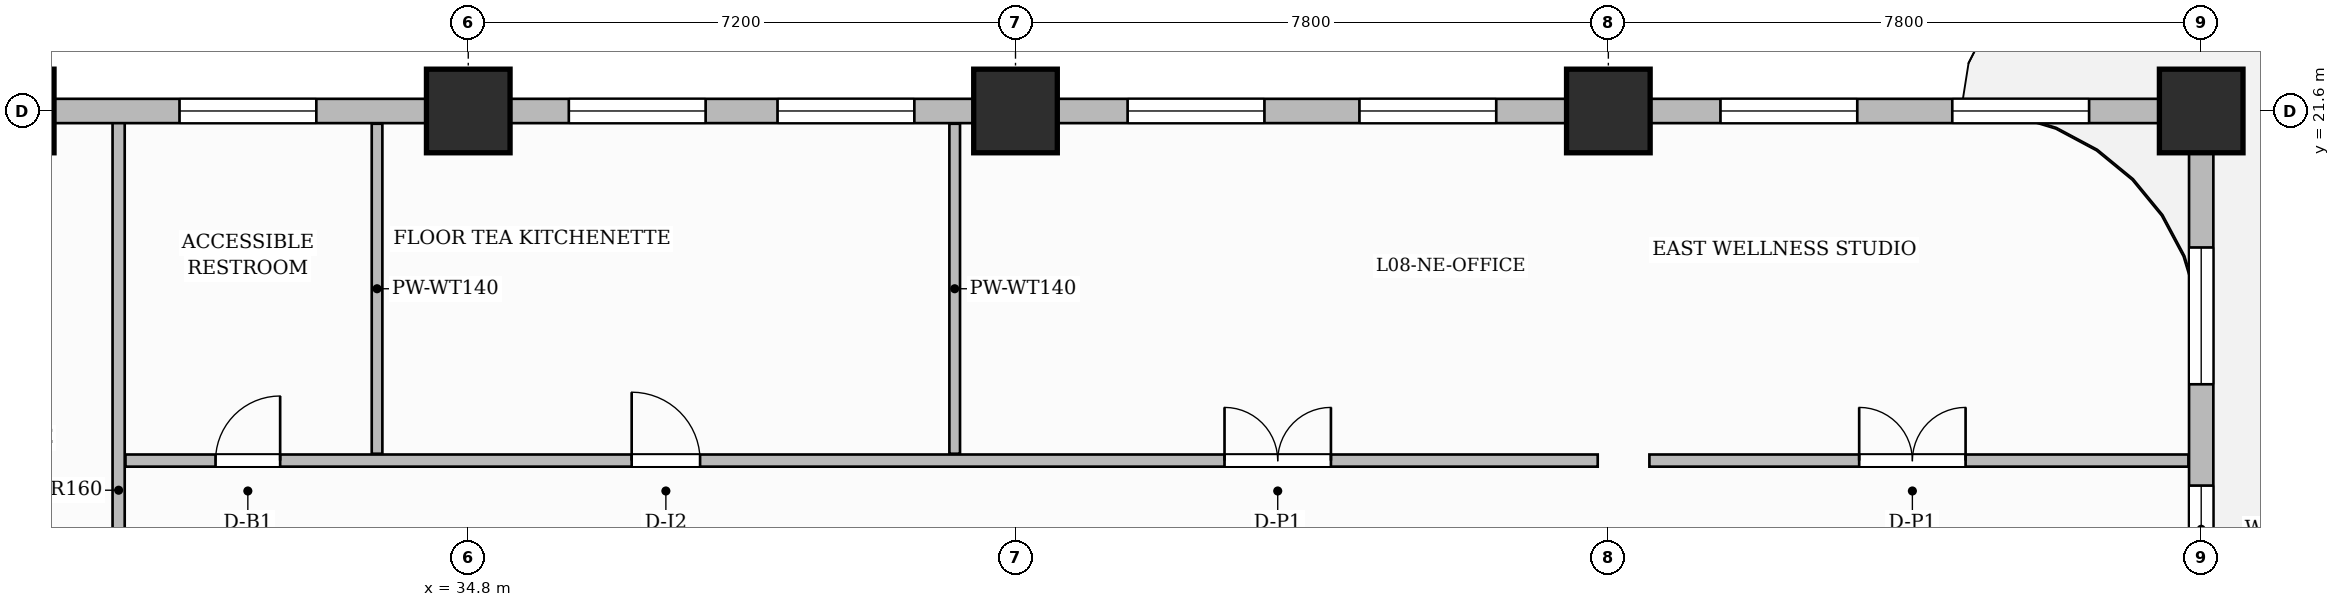
"""IFC4 building model, lengths in metres.
Left out: names, types, materials, properties, quantities, classifications, styles, units other than length and angle.
Written with IfcOpenShell. Run it as: python <this file> out.ifc"""

import sys

from ifc_helpers import new_model, si_unit, direction, frame, frame_2d, origin, origin_2d, place, context, subcontext, project, spatial, rectangle, extrude, source, transform, mapped, element, fill, save


model = new_model("IFC4")
c1 = context("Model", 3, precision=1e-05, world=origin(), true_north=direction((0.0, 1.0)))
c2 = subcontext(c1, "Body", "Model", "MODEL_VIEW")
j1 = project(units=[si_unit("LENGTHUNIT", "METRE"), si_unit("PLANEANGLEUNIT", "RADIAN")], contexts=[c1])
p1 = place(None, origin())
s1 = spatial("IfcSite", under=j1, at=p1, CompositionType="ELEMENT")
p2 = place(p1, origin())
s2 = spatial("IfcBuilding", under=s1, at=p2, CompositionType="ELEMENT")
p3 = place(p2, frame((0.0, 0.0, 39.8)))
s3 = spatial("IfcBuildingStorey", under=s2, at=p3, CompositionType="ELEMENT", Elevation=39.8)
m1 = source(origin(), c2, "Body", "SweptSolid", [
    extrude(rectangle(XDim=1.1, YDim=1.1, at=origin_2d()), origin(), (0.0, 0.0, 1.0), 3.7),
])
for number, where, z_axis, x_axis in (
    (1, (28.8, 21.6, 0.0), (0.0, 0.0, 1.0), (1.0, 0.0, 0.0)),
    (2, (34.8, 21.6, 0.0), (0.0, 0.0, 1.0), (1.0, 0.0, 0.0)),
    (3, (42.0, 21.6, 0.0), (0.0, 0.0, 1.0), (1.0, 0.0, 0.0)),
    (4, (49.8, 21.6, 0.0), (0.0, 0.0, 1.0), (1.0, 0.0, 0.0)),
    (5, (57.6, 21.6, 0.0), (0.0, 0.0, 1.0), (1.0, 0.0, 0.0)),
):
    element("IfcColumn", number, at=place(p3, frame(where, z_axis=z_axis, x_axis=x_axis)), inside=s3, PredefinedType="COLUMN", context=c2, shape_type="MappedRepresentation", body=[
        mapped(m1, transform((0.0, 0.0, 0.0), scale=1.0)),
    ])
p4 = place(p3, frame((30.2, 11.76, 0.0), z_axis=(0.0, 0.0, 1.0), x_axis=(0.0, 1.0, 0.0)))
e6 = element("IfcWall", 6, at=p4, inside=s3, PredefinedType="PARTITIONING", context=c2, shape_type="SweptSolid", body=[
    extrude(rectangle(XDim=9.7, YDim=0.16, at=frame_2d((4.85, 0.0))), origin(), (0.0, 0.0, 1.0), 3.45),
])
p5 = place(p3, frame((30.29, 17.0, 0.0), z_axis=(0.0, 0.0, 1.0), x_axis=(1.0, 0.0, 0.0)))
e7 = element("IfcWall", 7, at=p5, inside=s3, PredefinedType="PARTITIONING", context=c2, shape_type="SweptSolid", body=[
    extrude(rectangle(XDim=19.37, YDim=0.16, at=frame_2d((9.685, 0.0))), origin(), (0.0, 0.0, 1.0), 3.45),
])
p6 = place(p5, frame((1.185, 0.0, 0.0)))
e8 = element("IfcOpeningElement", 8, at=p6, cuts=e7, PredefinedType="OPENING", context=c2, shape_type="SweptSolid", body=[
    extrude(rectangle(XDim=0.85, YDim=2.1, at=frame_2d((0.425, 1.05))), frame((0.0, 0.09, 0.0), z_axis=(0.0, -1.0, 0.0), x_axis=(1.0, 0.0, 0.0)), (0.0, 0.0, 1.0), 0.18),
])
p7 = place(p5, frame((6.66, 0.0, 0.0)))
e9 = element("IfcOpeningElement", 9, at=p7, cuts=e7, PredefinedType="OPENING", context=c2, shape_type="SweptSolid", body=[
    extrude(rectangle(XDim=0.9, YDim=2.15, at=frame_2d((0.45, 1.075))), frame((0.0, 0.09, 0.0), z_axis=(0.0, -1.0, 0.0), x_axis=(1.0, 0.0, 0.0)), (0.0, 0.0, 1.0), 0.18),
])
p8 = place(p5, frame((14.46, 0.0, 0.0)))
e10 = element("IfcOpeningElement", 10, at=p8, cuts=e7, PredefinedType="OPENING", context=c2, shape_type="SweptSolid", body=[
    extrude(rectangle(XDim=1.4, YDim=2.35, at=frame_2d((0.7, 1.175))), frame((0.0, 0.09, 0.0), z_axis=(0.0, -1.0, 0.0), x_axis=(1.0, 0.0, 0.0)), (0.0, 0.0, 1.0), 0.18),
])
p9 = place(p3, frame((50.34, 17.0, 0.0), z_axis=(0.0, 0.0, 1.0), x_axis=(1.0, 0.0, 0.0)))
e11 = element("IfcWall", 11, at=p9, inside=s3, PredefinedType="PARTITIONING", context=c2, shape_type="SweptSolid", body=[
    extrude(rectangle(XDim=7.092, YDim=0.16, at=frame_2d((3.546, 0.0))), origin(), (0.0, 0.0, 1.0), 3.45),
])
p10 = place(p9, frame((2.76, 0.0, 0.0)))
e12 = element("IfcOpeningElement", 12, at=p10, cuts=e11, PredefinedType="OPENING", context=c2, shape_type="SweptSolid", body=[
    extrude(rectangle(XDim=1.4, YDim=2.35, at=frame_2d((0.7, 1.175))), frame((0.0, 0.09, 0.0), z_axis=(0.0, -1.0, 0.0), x_axis=(1.0, 0.0, 0.0)), (0.0, 0.0, 1.0), 0.18),
])
for number, where, z_axis, x_axis in (
    (13, (33.6, 17.09, 0.0), (0.0, 0.0, 1.0), (0.0, 1.0, 0.0)),
    (14, (41.2, 17.09, 0.0), (0.0, 0.0, 1.0), (0.0, 1.0, 0.0)),
):
    element("IfcWall", number, at=place(p3, frame(where, z_axis=z_axis, x_axis=x_axis)), inside=s3, PredefinedType="PARTITIONING", context=c2, shape_type="SweptSolid", body=[
        extrude(rectangle(XDim=4.342, YDim=0.14, at=frame_2d((2.171, 0.0))), origin(), (0.0, 0.0, 1.0), 3.45),
    ])
p11 = place(p3, frame((57.6, 0.05, 0.0), z_axis=(0.0, 0.0, 1.0), x_axis=(0.0, 1.0, 0.0)))
e15 = element("IfcWall", 15, at=p11, inside=s3, PredefinedType="SOLIDWALL", context=c2, shape_type="SweptSolid", body=[
    extrude(rectangle(XDim=21.5, YDim=0.32, at=frame_2d((10.75, 0.0))), origin(), (0.0, 0.0, 1.0), 2.885),
])
p12 = place(p11, frame((3.4, 0.0, 0.0)))
e16 = element("IfcOpeningElement", 16, at=p12, cuts=e15, PredefinedType="OPENING", context=c2, shape_type="SweptSolid", body=[
    extrude(rectangle(XDim=1.2, YDim=2.2, at=frame_2d((0.6, 1.1))), frame((0.0, 0.17, 0.0), z_axis=(0.0, -1.0, 0.0), x_axis=(1.0, 0.0, 0.0)), (0.0, 0.0, 1.0), 0.34),
])
p13 = place(p11, frame((1.225, 0.0, 0.8)))
e17 = element("IfcOpeningElement", 17, at=p13, cuts=e15, PredefinedType="OPENING", context=c2, shape_type="SweptSolid", body=[
    extrude(rectangle(XDim=1.4, YDim=1.85, at=frame_2d((0.7, 0.925))), frame((0.0, 0.17, 0.0), z_axis=(0.0, -1.0, 0.0), x_axis=(1.0, 0.0, 0.0)), (0.0, 0.0, 1.0), 0.34),
])
p14 = place(p11, frame((5.15, 0.0, 0.8)))
e18 = element("IfcOpeningElement", 18, at=p14, cuts=e15, PredefinedType="OPENING", context=c2, shape_type="SweptSolid", body=[
    extrude(rectangle(XDim=0.95, YDim=1.75, at=frame_2d((0.475, 0.875))), frame((0.0, 0.17, 0.0), z_axis=(0.0, -1.0, 0.0), x_axis=(1.0, 0.0, 0.0)), (0.0, 0.0, 1.0), 0.34),
])
p15 = place(p11, frame((8.475, 0.0, 0.8)))
e19 = element("IfcOpeningElement", 19, at=p15, cuts=e15, PredefinedType="OPENING", context=c2, shape_type="SweptSolid", body=[
    extrude(rectangle(XDim=1.8, YDim=1.85, at=frame_2d((0.9, 0.925))), frame((0.0, 0.17, 0.0), z_axis=(0.0, -1.0, 0.0), x_axis=(1.0, 0.0, 0.0)), (0.0, 0.0, 1.0), 0.34),
])
p16 = place(p11, frame((11.225, 0.0, 0.8)))
e20 = element("IfcOpeningElement", 20, at=p16, cuts=e15, PredefinedType="OPENING", context=c2, shape_type="SweptSolid", body=[
    extrude(rectangle(XDim=1.8, YDim=1.85, at=frame_2d((0.9, 0.925))), frame((0.0, 0.17, 0.0), z_axis=(0.0, -1.0, 0.0), x_axis=(1.0, 0.0, 0.0)), (0.0, 0.0, 1.0), 0.34),
])
p17 = place(p11, frame((15.471, 0.0, 0.8)))
e21 = element("IfcOpeningElement", 21, at=p17, cuts=e15, PredefinedType="OPENING", context=c2, shape_type="SweptSolid", body=[
    extrude(rectangle(XDim=1.15, YDim=1.8, at=frame_2d((0.575, 0.9))), frame((0.0, 0.17, 0.0), z_axis=(0.0, -1.0, 0.0), x_axis=(1.0, 0.0, 0.0)), (0.0, 0.0, 1.0), 0.34),
])
p18 = place(p11, frame((17.954, 0.0, 0.8)))
e22 = element("IfcOpeningElement", 22, at=p18, cuts=e15, PredefinedType="OPENING", context=c2, shape_type="SweptSolid", body=[
    extrude(rectangle(XDim=1.8, YDim=1.85, at=frame_2d((0.9, 0.925))), frame((0.0, 0.17, 0.0), z_axis=(0.0, -1.0, 0.0), x_axis=(1.0, 0.0, 0.0)), (0.0, 0.0, 1.0), 0.34),
])
p19 = place(p3, frame((14.4, 21.6, 0.0), z_axis=(0.0, 0.0, 1.0), x_axis=(1.0, 0.0, 0.0)))
e23 = element("IfcWall", 23, at=p19, inside=s3, PredefinedType="SOLIDWALL", context=c2, shape_type="SweptSolid", body=[
    extrude(rectangle(XDim=43.2, YDim=0.32, at=frame_2d((21.6, 0.0))), origin(), (0.0, 0.0, 1.0), 2.885),
])
p20 = place(p19, frame((1.5, 0.0, 0.0)))
e24 = element("IfcOpeningElement", 24, at=p20, cuts=e23, PredefinedType="OPENING", context=c2, shape_type="SweptSolid", body=[
    extrude(rectangle(XDim=1.2, YDim=2.2, at=frame_2d((0.6, 1.1))), frame((0.0, 0.17, 0.0), z_axis=(0.0, -1.0, 0.0), x_axis=(1.0, 0.0, 0.0)), (0.0, 0.0, 1.0), 0.34),
])
p21 = place(p19, frame((3.336, 0.0, 0.8)))
e25 = element("IfcOpeningElement", 25, at=p21, cuts=e23, PredefinedType="OPENING", context=c2, shape_type="SweptSolid", body=[
    extrude(rectangle(XDim=1.4, YDim=1.85, at=frame_2d((0.7, 0.925))), frame((0.0, 0.17, 0.0), z_axis=(0.0, -1.0, 0.0), x_axis=(1.0, 0.0, 0.0)), (0.0, 0.0, 1.0), 0.34),
])
p22 = place(p19, frame((5.269, 0.0, 0.8)))
e26 = element("IfcOpeningElement", 26, at=p22, cuts=e23, PredefinedType="OPENING", context=c2, shape_type="SweptSolid", body=[
    extrude(rectangle(XDim=0.95, YDim=1.75, at=frame_2d((0.475, 0.875))), frame((0.0, 0.17, 0.0), z_axis=(0.0, -1.0, 0.0), x_axis=(1.0, 0.0, 0.0)), (0.0, 0.0, 1.0), 0.34),
])
p23 = place(p19, frame((8.321, 0.0, 0.8)))
e27 = element("IfcOpeningElement", 27, at=p23, cuts=e23, PredefinedType="OPENING", context=c2, shape_type="SweptSolid", body=[
    extrude(rectangle(XDim=1.15, YDim=1.8, at=frame_2d((0.575, 0.9))), frame((0.0, 0.17, 0.0), z_axis=(0.0, -1.0, 0.0), x_axis=(1.0, 0.0, 0.0)), (0.0, 0.0, 1.0), 0.34),
])
p24 = place(p19, frame((10.804, 0.0, 0.8)))
e28 = element("IfcOpeningElement", 28, at=p24, cuts=e23, PredefinedType="OPENING", context=c2, shape_type="SweptSolid", body=[
    extrude(rectangle(XDim=1.8, YDim=1.85, at=frame_2d((0.9, 0.925))), frame((0.0, 0.17, 0.0), z_axis=(0.0, -1.0, 0.0), x_axis=(1.0, 0.0, 0.0)), (0.0, 0.0, 1.0), 0.34),
])
p25 = place(p19, frame((16.601, 0.0, 0.8)))
e29 = element("IfcOpeningElement", 29, at=p25, cuts=e23, PredefinedType="OPENING", context=c2, shape_type="SweptSolid", body=[
    extrude(rectangle(XDim=1.8, YDim=1.85, at=frame_2d((0.9, 0.925))), frame((0.0, 0.17, 0.0), z_axis=(0.0, -1.0, 0.0), x_axis=(1.0, 0.0, 0.0)), (0.0, 0.0, 1.0), 0.34),
])
p26 = place(p19, frame((21.723, 0.0, 0.8)))
e30 = element("IfcOpeningElement", 30, at=p26, cuts=e23, PredefinedType="OPENING", context=c2, shape_type="SweptSolid", body=[
    extrude(rectangle(XDim=1.8, YDim=1.85, at=frame_2d((0.9, 0.925))), frame((0.0, 0.17, 0.0), z_axis=(0.0, -1.0, 0.0), x_axis=(1.0, 0.0, 0.0)), (0.0, 0.0, 1.0), 0.34),
])
p27 = place(p19, frame((24.469, 0.0, 0.8)))
e31 = element("IfcOpeningElement", 31, at=p27, cuts=e23, PredefinedType="OPENING", context=c2, shape_type="SweptSolid", body=[
    extrude(rectangle(XDim=1.8, YDim=1.85, at=frame_2d((0.9, 0.925))), frame((0.0, 0.17, 0.0), z_axis=(0.0, -1.0, 0.0), x_axis=(1.0, 0.0, 0.0)), (0.0, 0.0, 1.0), 0.34),
])
p28 = place(p19, frame((29.075, 0.0, 0.8)))
e32 = element("IfcOpeningElement", 32, at=p28, cuts=e23, PredefinedType="OPENING", context=c2, shape_type="SweptSolid", body=[
    extrude(rectangle(XDim=1.8, YDim=1.85, at=frame_2d((0.9, 0.925))), frame((0.0, 0.17, 0.0), z_axis=(0.0, -1.0, 0.0), x_axis=(1.0, 0.0, 0.0)), (0.0, 0.0, 1.0), 0.34),
])
p29 = place(p19, frame((32.125, 0.0, 0.8)))
e33 = element("IfcOpeningElement", 33, at=p29, cuts=e23, PredefinedType="OPENING", context=c2, shape_type="SweptSolid", body=[
    extrude(rectangle(XDim=1.8, YDim=1.85, at=frame_2d((0.9, 0.925))), frame((0.0, 0.17, 0.0), z_axis=(0.0, -1.0, 0.0), x_axis=(1.0, 0.0, 0.0)), (0.0, 0.0, 1.0), 0.34),
])
p30 = place(p19, frame((36.875, 0.0, 0.8)))
e34 = element("IfcOpeningElement", 34, at=p30, cuts=e23, PredefinedType="OPENING", context=c2, shape_type="SweptSolid", body=[
    extrude(rectangle(XDim=1.8, YDim=1.85, at=frame_2d((0.9, 0.925))), frame((0.0, 0.17, 0.0), z_axis=(0.0, -1.0, 0.0), x_axis=(1.0, 0.0, 0.0)), (0.0, 0.0, 1.0), 0.34),
])
p31 = place(p19, frame((39.925, 0.0, 0.8)))
e35 = element("IfcOpeningElement", 35, at=p31, cuts=e23, PredefinedType="OPENING", context=c2, shape_type="SweptSolid", body=[
    extrude(rectangle(XDim=1.8, YDim=1.85, at=frame_2d((0.9, 0.925))), frame((0.0, 0.17, 0.0), z_axis=(0.0, -1.0, 0.0), x_axis=(1.0, 0.0, 0.0)), (0.0, 0.0, 1.0), 0.34),
])
m2 = source(origin(), c2, "Body", "SweptSolid", [
    extrude(rectangle(XDim=1.4, YDim=2.35, at=frame_2d((0.7, 1.175))), frame((0.0, 0.025, 0.0), z_axis=(0.0, -1.0, 0.0), x_axis=(1.0, 0.0, 0.0)), (0.0, 0.0, 1.0), 0.05),
])
p32 = place(p10, origin())
e36 = element("IfcDoor", 36, at=p32, inside=s3, OperationType="DOUBLE_DOOR_SINGLE_SWING", PredefinedType="DOOR", context=c2, shape_type="MappedRepresentation", body=[
    mapped(m2, transform((0.0, 0.0, 0.0), scale=1.0)),
])
fill(e12, e36)
m3 = source(origin(), c2, "Body", "SweptSolid", [
    extrude(rectangle(XDim=0.85, YDim=2.1, at=frame_2d((0.425, 1.05))), frame((0.0, 0.025, 0.0), z_axis=(0.0, -1.0, 0.0), x_axis=(1.0, 0.0, 0.0)), (0.0, 0.0, 1.0), 0.05),
])
p33 = place(p6, origin())
e37 = element("IfcDoor", 37, at=p33, inside=s3, OperationType="SINGLE_SWING_RIGHT", PredefinedType="DOOR", context=c2, shape_type="MappedRepresentation", body=[
    mapped(m3, transform((0.0, 0.0, 0.0), scale=1.0)),
])
fill(e8, e37)
m4 = source(origin(), c2, "Body", "SweptSolid", [
    extrude(rectangle(XDim=0.9, YDim=2.15, at=frame_2d((0.45, 1.075))), frame((0.0, 0.025, 0.0), z_axis=(0.0, -1.0, 0.0), x_axis=(1.0, 0.0, 0.0)), (0.0, 0.0, 1.0), 0.05),
])
p34 = place(p7, origin())
e38 = element("IfcDoor", 38, at=p34, inside=s3, OperationType="SINGLE_SWING_LEFT", PredefinedType="DOOR", context=c2, shape_type="MappedRepresentation", body=[
    mapped(m4, transform((0.0, 0.0, 0.0), scale=1.0)),
])
fill(e9, e38)
p35 = place(p8, origin())
e39 = element("IfcDoor", 39, at=p35, inside=s3, OperationType="DOUBLE_DOOR_SINGLE_SWING", PredefinedType="DOOR", context=c2, shape_type="MappedRepresentation", body=[
    mapped(m2, transform((0.0, 0.0, 0.0), scale=1.0)),
])
fill(e10, e39)
m5 = source(origin(), c2, "Body", "SweptSolid", [
    extrude(rectangle(XDim=1.15, YDim=1.8, at=frame_2d((0.575, 0.9))), frame((0.0, 0.03, 0.0), z_axis=(0.0, -1.0, 0.0), x_axis=(1.0, 0.0, 0.0)), (0.0, 0.0, 1.0), 0.06),
])
p36 = place(p17, origin())
e40 = element("IfcWindow", 40, at=p36, inside=s3, PartitioningType="SINGLE_PANEL", PredefinedType="WINDOW", context=c2, shape_type="MappedRepresentation", body=[
    mapped(m5, transform((0.0, 0.0, 0.0), scale=1.0)),
])
fill(e21, e40)
m6 = source(origin(), c2, "Body", "SweptSolid", [
    extrude(rectangle(XDim=1.8, YDim=1.85, at=frame_2d((0.9, 0.925))), frame((0.0, 0.03, 0.0), z_axis=(0.0, -1.0, 0.0), x_axis=(1.0, 0.0, 0.0)), (0.0, 0.0, 1.0), 0.06),
])
p37 = place(p18, origin())
e41 = element("IfcWindow", 41, at=p37, inside=s3, PartitioningType="DOUBLE_PANEL_VERTICAL", PredefinedType="WINDOW", context=c2, shape_type="MappedRepresentation", body=[
    mapped(m6, transform((0.0, 0.0, 0.0), scale=1.0)),
])
fill(e22, e41)
p38 = place(p25, origin())
e42 = element("IfcWindow", 42, at=p38, inside=s3, PartitioningType="DOUBLE_PANEL_VERTICAL", PredefinedType="WINDOW", context=c2, shape_type="MappedRepresentation", body=[
    mapped(m6, transform((0.0, 0.0, 0.0), scale=1.0)),
])
fill(e29, e42)
p39 = place(p26, origin())
e43 = element("IfcWindow", 43, at=p39, inside=s3, PartitioningType="DOUBLE_PANEL_VERTICAL", PredefinedType="WINDOW", context=c2, shape_type="MappedRepresentation", body=[
    mapped(m6, transform((0.0, 0.0, 0.0), scale=1.0)),
])
fill(e30, e43)
p40 = place(p27, origin())
e44 = element("IfcWindow", 44, at=p40, inside=s3, PartitioningType="DOUBLE_PANEL_VERTICAL", PredefinedType="WINDOW", context=c2, shape_type="MappedRepresentation", body=[
    mapped(m6, transform((0.0, 0.0, 0.0), scale=1.0)),
])
fill(e31, e44)
p41 = place(p28, origin())
e45 = element("IfcWindow", 45, at=p41, inside=s3, PartitioningType="DOUBLE_PANEL_VERTICAL", PredefinedType="WINDOW", context=c2, shape_type="MappedRepresentation", body=[
    mapped(m6, transform((0.0, 0.0, 0.0), scale=1.0)),
])
fill(e32, e45)
p42 = place(p29, origin())
e46 = element("IfcWindow", 46, at=p42, inside=s3, PartitioningType="DOUBLE_PANEL_VERTICAL", PredefinedType="WINDOW", context=c2, shape_type="MappedRepresentation", body=[
    mapped(m6, transform((0.0, 0.0, 0.0), scale=1.0)),
])
fill(e33, e46)
p43 = place(p30, origin())
e47 = element("IfcWindow", 47, at=p43, inside=s3, PartitioningType="DOUBLE_PANEL_VERTICAL", PredefinedType="WINDOW", context=c2, shape_type="MappedRepresentation", body=[
    mapped(m6, transform((0.0, 0.0, 0.0), scale=1.0)),
])
fill(e34, e47)
p44 = place(p31, origin())
e48 = element("IfcWindow", 48, at=p44, inside=s3, PartitioningType="DOUBLE_PANEL_VERTICAL", PredefinedType="WINDOW", context=c2, shape_type="MappedRepresentation", body=[
    mapped(m6, transform((0.0, 0.0, 0.0), scale=1.0)),
])
fill(e35, e48)
save(model, sys.argv[1])
